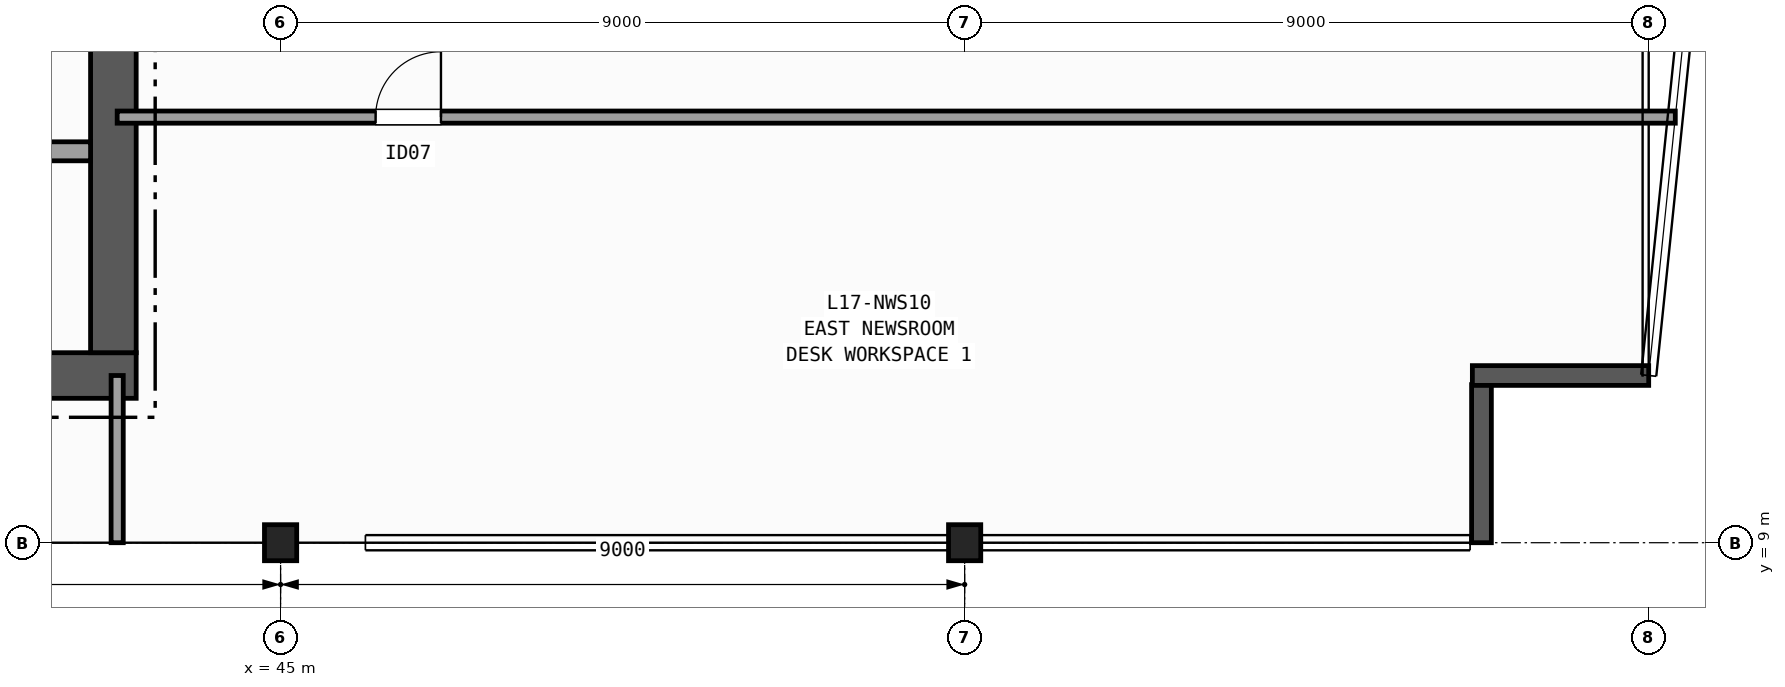
"""IFC4 building model, lengths in metres.
Left out: names, types, materials, properties, quantities, classifications, styles, units other than length and angle.
Written with IfcOpenShell. Run it as: python <this file> out.ifc"""

import sys

from ifc_helpers import new_model, si_unit, direction, frame, frame_2d, origin, origin_2d, place, context, subcontext, project, spatial, rectangle, i_section, extrude, element, fill, save


model = new_model("IFC4")
c1 = context("Model", 3, precision=1e-05, world=origin(), true_north=direction((0.0, 1.0)))
c2 = subcontext(c1, "Body", "Model", "MODEL_VIEW")
j1 = project(units=[si_unit("LENGTHUNIT", "METRE"), si_unit("PLANEANGLEUNIT", "RADIAN")], contexts=[c1])
p1 = place(None, origin())
s1 = spatial("IfcSite", under=j1, at=p1, CompositionType="ELEMENT")
p2 = place(p1, origin())
s2 = spatial("IfcBuilding", under=s1, at=p2, CompositionType="ELEMENT")
p3 = place(p2, frame((0.0, 0.0, 73.0)))
s3 = spatial("IfcBuildingStorey", under=s2, at=p3, CompositionType="ELEMENT", Elevation=73.0)
for number, where, z_axis, x_axis in (
    (1, (45.0, 9.0, 0.0), (0.0, 0.0, 1.0), (1.0, 0.0, 0.0)),
    (2, (54.0, 9.0, 0.0), (0.0, 0.0, 1.0), (1.0, 0.0, 0.0)),
):
    element("IfcColumn", number, at=place(p3, frame(where, z_axis=z_axis, x_axis=x_axis)), inside=s3, PredefinedType="COLUMN", context=c2, shape_type="SweptSolid", body=[
        extrude(i_section(OverallWidth=0.424, OverallDepth=0.474, WebThickness=0.048, FlangeThickness=0.077, FilletRadius=0.015, at=origin_2d()), origin(), (0.0, 0.0, 1.0), 3.7),
    ])
p4 = place(p3, frame((60.8, 9.0, 0.0), z_axis=(0.0, 0.0, 1.0), x_axis=(0.0, 1.0, 0.0)))
e3 = element("IfcWall", 3, at=p4, inside=s3, PredefinedType="SOLIDWALL", context=c2, shape_type="SweptSolid", body=[
    extrude(rectangle(XDim=2.08, YDim=0.26, at=frame_2d((1.04, 0.0))), origin(), (0.0, 0.0, 1.0), 3.42),
])
p5 = place(p3, frame((60.68, 11.2, 0.0), z_axis=(0.0, 0.0, 1.0), x_axis=(1.0, 0.0, 0.0)))
e4 = element("IfcWall", 4, at=p5, inside=s3, PredefinedType="SOLIDWALL", context=c2, shape_type="SweptSolid", body=[
    extrude(rectangle(XDim=2.32, YDim=0.26, at=frame_2d((1.16, 0.0))), origin(), (0.0, 0.0, 1.0), 3.42),
])
p6 = place(p3, frame((29.1, 11.2, 0.0), z_axis=(0.0, 0.0, 1.0), x_axis=(1.0, 0.0, 0.0)))
e5 = element("IfcWall", 5, at=p6, inside=s3, PredefinedType="SHEAR", context=c2, shape_type="SweptSolid", body=[
    extrude(rectangle(XDim=14.0, YDim=0.6, at=frame_2d((7.0, 0.0))), origin(), (0.0, 0.0, 1.0), 3.42),
])
p7 = place(p3, frame((42.8, 11.5, 0.0), z_axis=(0.0, 0.0, 1.0), x_axis=(0.0, 1.0, 0.0)))
e6 = element("IfcWall", 6, at=p7, inside=s3, PredefinedType="SHEAR", context=c2, shape_type="SweptSolid", body=[
    extrude(rectangle(XDim=12.8, YDim=0.6, at=frame_2d((6.4, 0.0))), origin(), (0.0, 0.0, 1.0), 3.42),
])
p8 = place(p3, frame((33.07, 14.15, 0.0), z_axis=(0.0, 0.0, 1.0), x_axis=(1.0, 0.0, 0.0)))
e7 = element("IfcWall", 7, at=p8, inside=s3, PredefinedType="PARTITIONING", context=c2, shape_type="SweptSolid", body=[
    extrude(rectangle(XDim=9.43, YDim=0.25, at=frame_2d((4.715, 0.0))), origin(), (0.0, 0.0, 1.0), 3.42),
])
p9 = place(p8, frame((0.755, 0.0, 0.0)))
e8 = element("IfcOpeningElement", 8, at=p9, cuts=e7, PredefinedType="OPENING", context=c2, shape_type="SweptSolid", body=[
    extrude(rectangle(XDim=1.15, YDim=2.15, at=frame_2d((0.575, 1.075))), frame((0.0, 0.135, 0.0), z_axis=(0.0, -1.0, 0.0), x_axis=(1.0, 0.0, 0.0)), (0.0, 0.0, 1.0), 0.27),
])
p10 = place(p8, frame((3.355, 0.0, 0.0)))
e9 = element("IfcOpeningElement", 9, at=p10, cuts=e7, PredefinedType="OPENING", context=c2, shape_type="SweptSolid", body=[
    extrude(rectangle(XDim=1.15, YDim=2.15, at=frame_2d((0.575, 1.075))), frame((0.0, 0.135, 0.0), z_axis=(0.0, -1.0, 0.0), x_axis=(1.0, 0.0, 0.0)), (0.0, 0.0, 1.0), 0.27),
])
p11 = place(p3, frame((42.85, 9.0, 0.0), z_axis=(0.0, 0.0, 1.0), x_axis=(0.0, 1.0, 0.0)))
e10 = element("IfcWall", 10, at=p11, inside=s3, PredefinedType="PARTITIONING", context=c2, shape_type="SweptSolid", body=[
    extrude(rectangle(XDim=2.2, YDim=0.16, at=frame_2d((1.1, 0.0))), origin(), (0.0, 0.0, 1.0), 2.627),
])
p12 = place(p3, frame((42.85, 14.6, 0.0), z_axis=(0.0, 0.0, 1.0), x_axis=(1.0, 0.0, 0.0)))
e11 = element("IfcWall", 11, at=p12, inside=s3, PredefinedType="PARTITIONING", context=c2, shape_type="SweptSolid", body=[
    extrude(rectangle(XDim=20.5, YDim=0.16, at=frame_2d((10.25, 0.0))), origin(), (0.0, 0.0, 1.0), 3.42),
])
p13 = place(p12, frame((3.4, 0.0, 0.0)))
e12 = element("IfcOpeningElement", 12, at=p13, cuts=e11, PredefinedType="OPENING", context=c2, shape_type="SweptSolid", body=[
    extrude(rectangle(XDim=0.86, YDim=2.05, at=frame_2d((0.43, 1.025))), frame((0.0, 0.09, 0.0), z_axis=(0.0, -1.0, 0.0), x_axis=(1.0, 0.0, 0.0)), (0.0, 0.0, 1.0), 0.18),
])
p14 = place(p13, origin())
e13 = element("IfcDoor", 13, at=p14, inside=s3, OperationType="SINGLE_SWING_RIGHT", PredefinedType="DOOR", context=c2, shape_type="SweptSolid", body=[
    extrude(rectangle(XDim=0.86, YDim=2.05, at=frame_2d((0.43, 1.025))), frame((0.0, 0.025, 0.0), z_axis=(0.0, -1.0, 0.0), x_axis=(1.0, 0.0, 0.0)), (0.0, 0.0, 1.0), 0.05),
])
fill(e12, e13)
save(model, sys.argv[1])
